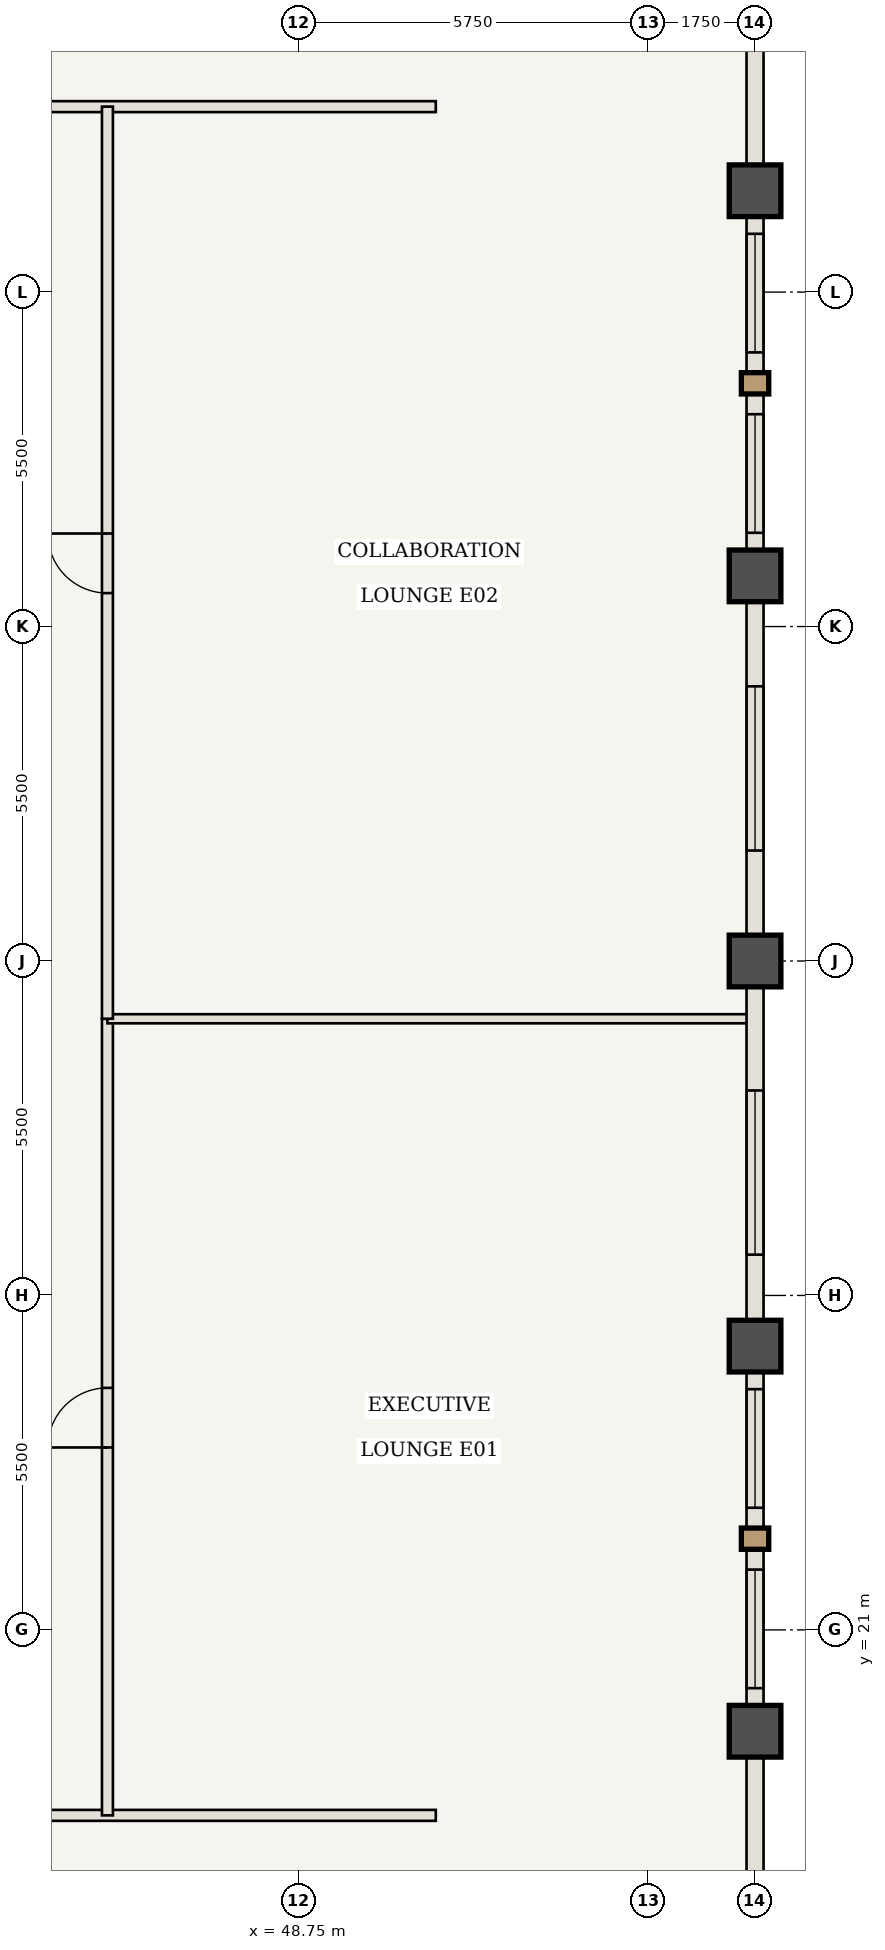
"""IFC4 building model, lengths in metres.
Left out: names, types, materials, properties, quantities, classifications, styles, units other than length and angle.
Written with IfcOpenShell. Run it as: python <this file> out.ifc"""

import sys

from ifc_helpers import new_model, si_unit, direction, frame, frame_2d, origin, origin_2d, place, context, subcontext, project, spatial, rectangle, extrude, element, fill, save


model = new_model("IFC4")
c1 = context("Model", 3, precision=1e-05, world=origin(), true_north=direction((0.0, 1.0)))
c2 = subcontext(c1, "Body", "Model", "MODEL_VIEW")
j1 = project(units=[si_unit("LENGTHUNIT", "METRE"), si_unit("PLANEANGLEUNIT", "RADIAN")], contexts=[c1])
p1 = place(None, origin())
s1 = spatial("IfcSite", under=j1, at=p1, CompositionType="ELEMENT")
p2 = place(p1, origin())
s2 = spatial("IfcBuilding", under=s1, at=p2, CompositionType="ELEMENT")
p3 = place(p2, frame((0.0, 0.0, 225.4)))
s3 = spatial("IfcBuildingStorey", under=s2, at=p3, CompositionType="ELEMENT", Elevation=225.4)
for number, where, z_axis, x_axis in (
    (1, (56.25, 19.333, 0.0), (0.0, 0.0, 1.0), (1.0, 0.0, 0.0)),
    (2, (56.25, 25.667, 0.0), (0.0, 0.0, 1.0), (1.0, 0.0, 0.0)),
    (3, (56.25, 32.0, 0.0), (0.0, 0.0, 1.0), (1.0, 0.0, 0.0)),
    (4, (56.25, 38.333, 0.0), (0.0, 0.0, 1.0), (1.0, 0.0, 0.0)),
    (5, (56.25, 44.667, 0.0), (0.0, 0.0, 1.0), (1.0, 0.0, 0.0)),
):
    element("IfcColumn", number, at=place(p3, frame(where, z_axis=z_axis, x_axis=x_axis)), inside=s3, PredefinedType="COLUMN", context=c2, shape_type="SweptSolid", body=[
        extrude(rectangle(XDim=0.85, YDim=0.85, at=origin_2d()), origin(), (0.0, 0.0, 1.0), 3.85),
    ])
p4 = place(p3, frame((39.258, 17.95, 0.0), z_axis=(0.0, 0.0, 1.0), x_axis=(1.0, 0.0, 0.0)))
e6 = element("IfcWall", 6, at=p4, inside=s3, PredefinedType="STANDARD", context=c2, shape_type="SweptSolid", body=[
    extrude(rectangle(XDim=11.742, YDim=0.18, at=frame_2d((5.871, 0.0))), origin(), (0.0, 0.0, 1.0), 3.685),
])
p5 = place(p4, frame((1.196, 0.0, 0.0)))
e7 = element("IfcOpeningElement", 7, at=p5, cuts=e6, PredefinedType="OPENING", context=c2, shape_type="SweptSolid", body=[
    extrude(rectangle(XDim=0.98, YDim=2.2, at=frame_2d((0.49, 1.1))), frame((0.0, 0.1, 0.0), z_axis=(0.0, -1.0, 0.0), x_axis=(1.0, 0.0, 0.0)), (0.0, 0.0, 1.0), 0.2),
])
p6 = place(p3, frame((13.0, 46.05, 0.0), z_axis=(0.0, 0.0, 1.0), x_axis=(1.0, 0.0, 0.0)))
e8 = element("IfcWall", 8, at=p6, inside=s3, PredefinedType="STANDARD", context=c2, shape_type="SweptSolid", body=[
    extrude(rectangle(XDim=38.0, YDim=0.18, at=frame_2d((19.0, 0.0))), origin(), (0.0, 0.0, 1.0), 3.685),
])
p7 = place(p6, frame((19.7, 0.0, 0.0)))
e9 = element("IfcOpeningElement", 9, at=p7, cuts=e8, PredefinedType="OPENING", context=c2, shape_type="SweptSolid", body=[
    extrude(rectangle(XDim=0.98, YDim=2.2, at=frame_2d((0.49, 1.1))), frame((0.0, 0.1, 0.0), z_axis=(0.0, -1.0, 0.0), x_axis=(1.0, 0.0, 0.0)), (0.0, 0.0, 1.0), 0.2),
])
p8 = place(p3, frame((45.6, 17.95, 0.0), z_axis=(0.0, 0.0, 1.0), x_axis=(0.0, 1.0, 0.0)))
e10 = element("IfcWall", 10, at=p8, inside=s3, PredefinedType="STANDARD", context=c2, shape_type="SweptSolid", body=[
    extrude(rectangle(XDim=13.1, YDim=0.18, at=frame_2d((6.55, 0.0))), origin(), (0.0, 0.0, 1.0), 3.685),
])
p9 = place(p8, frame((6.05, 0.0, 0.0)))
e11 = element("IfcOpeningElement", 11, at=p9, cuts=e10, PredefinedType="OPENING", context=c2, shape_type="SweptSolid", body=[
    extrude(rectangle(XDim=0.98, YDim=2.2, at=frame_2d((0.49, 1.1))), frame((0.0, 0.1, 0.0), z_axis=(0.0, -1.0, 0.0), x_axis=(1.0, 0.0, 0.0)), (0.0, 0.0, 1.0), 0.2),
])
p10 = place(p3, frame((45.6, 31.05, 0.0), z_axis=(0.0, 0.0, 1.0), x_axis=(1.0, 0.0, 0.0)))
e12 = element("IfcWall", 12, at=p10, inside=s3, PredefinedType="STANDARD", context=c2, shape_type="SweptSolid", body=[
    extrude(rectangle(XDim=10.59, YDim=0.15, at=frame_2d((5.295, 0.0))), origin(), (0.0, 0.0, 1.0), 3.685),
])
p11 = place(p3, frame((45.6, 31.05, 0.0), z_axis=(0.0, 0.0, 1.0), x_axis=(0.0, 1.0, 0.0)))
e13 = element("IfcWall", 13, at=p11, inside=s3, PredefinedType="STANDARD", context=c2, shape_type="SweptSolid", body=[
    extrude(rectangle(XDim=15.0, YDim=0.18, at=frame_2d((7.5, 0.0))), origin(), (0.0, 0.0, 1.0), 3.685),
])
p12 = place(p11, frame((7.0, 0.0, 0.0)))
e14 = element("IfcOpeningElement", 14, at=p12, cuts=e13, PredefinedType="OPENING", context=c2, shape_type="SweptSolid", body=[
    extrude(rectangle(XDim=0.98, YDim=2.2, at=frame_2d((0.49, 1.1))), frame((0.0, 0.1, 0.0), z_axis=(0.0, -1.0, 0.0), x_axis=(1.0, 0.0, 0.0)), (0.0, 0.0, 1.0), 0.2),
])
p13 = place(p3, frame((56.25, 19.333, 0.0), z_axis=(0.0, 0.0, 1.0), x_axis=(0.0, -1.0, 0.0)))
e15 = element("IfcWall", 15, at=p13, inside=s3, PredefinedType="USERDEFINED", context=c2, shape_type="SweptSolid", body=[
    extrude(rectangle(XDim=6.333, YDim=0.28, at=frame_2d((3.167, 0.0))), origin(), (0.0, 0.0, 1.0), 2.985),
])
p14 = place(p3, frame((56.25, 25.667, 0.0), z_axis=(0.0, 0.0, 1.0), x_axis=(0.0, -1.0, 0.0)))
e16 = element("IfcWall", 16, at=p14, inside=s3, PredefinedType="USERDEFINED", context=c2, shape_type="SweptSolid", body=[
    extrude(rectangle(XDim=6.333, YDim=0.28, at=frame_2d((3.167, 0.0))), origin(), (0.0, 0.0, 1.0), 2.985),
])
p15 = place(p14, frame((0.708, 0.0, 0.85)))
e17 = element("IfcOpeningElement", 17, at=p15, cuts=e16, PredefinedType="OPENING", context=c2, shape_type="SweptSolid", body=[
    extrude(rectangle(XDim=1.95, YDim=1.935, at=frame_2d((0.975, 0.968))), frame((0.0, 0.15, 0.0), z_axis=(0.0, -1.0, 0.0), x_axis=(1.0, 0.0, 0.0)), (0.0, 0.0, 1.0), 0.3),
])
p16 = place(p14, frame((3.675, 0.0, 0.85)))
e18 = element("IfcOpeningElement", 18, at=p16, cuts=e16, PredefinedType="OPENING", context=c2, shape_type="SweptSolid", body=[
    extrude(rectangle(XDim=1.95, YDim=1.935, at=frame_2d((0.975, 0.968))), frame((0.0, 0.15, 0.0), z_axis=(0.0, -1.0, 0.0), x_axis=(1.0, 0.0, 0.0)), (0.0, 0.0, 1.0), 0.3),
])
p17 = place(p3, frame((56.25, 32.0, 0.0), z_axis=(0.0, 0.0, 1.0), x_axis=(0.0, -1.0, 0.0)))
e19 = element("IfcWall", 19, at=p17, inside=s3, PredefinedType="USERDEFINED", context=c2, shape_type="SweptSolid", body=[
    extrude(rectangle(XDim=6.333, YDim=0.28, at=frame_2d((3.167, 0.0))), origin(), (0.0, 0.0, 1.0), 2.985),
])
p18 = place(p17, frame((2.129, 0.0, 0.85)))
e20 = element("IfcOpeningElement", 20, at=p18, cuts=e19, PredefinedType="OPENING", context=c2, shape_type="SweptSolid", body=[
    extrude(rectangle(XDim=2.7, YDim=1.935, at=frame_2d((1.35, 0.968))), frame((0.0, 0.15, 0.0), z_axis=(0.0, -1.0, 0.0), x_axis=(1.0, 0.0, 0.0)), (0.0, 0.0, 1.0), 0.3),
])
p19 = place(p3, frame((56.25, 38.333, 0.0), z_axis=(0.0, 0.0, 1.0), x_axis=(0.0, -1.0, 0.0)))
e21 = element("IfcWall", 21, at=p19, inside=s3, PredefinedType="USERDEFINED", context=c2, shape_type="SweptSolid", body=[
    extrude(rectangle(XDim=6.333, YDim=0.28, at=frame_2d((3.167, 0.0))), origin(), (0.0, 0.0, 1.0), 2.985),
])
p20 = place(p19, frame((1.817, 0.0, 0.85)))
e22 = element("IfcOpeningElement", 22, at=p20, cuts=e21, PredefinedType="OPENING", context=c2, shape_type="SweptSolid", body=[
    extrude(rectangle(XDim=2.7, YDim=1.935, at=frame_2d((1.35, 0.968))), frame((0.0, 0.15, 0.0), z_axis=(0.0, -1.0, 0.0), x_axis=(1.0, 0.0, 0.0)), (0.0, 0.0, 1.0), 0.3),
])
p21 = place(p3, frame((56.25, 44.667, 0.0), z_axis=(0.0, 0.0, 1.0), x_axis=(0.0, -1.0, 0.0)))
e23 = element("IfcWall", 23, at=p21, inside=s3, PredefinedType="USERDEFINED", context=c2, shape_type="SweptSolid", body=[
    extrude(rectangle(XDim=6.333, YDim=0.28, at=frame_2d((3.167, 0.0))), origin(), (0.0, 0.0, 1.0), 2.985),
])
p22 = place(p21, frame((0.708, 0.0, 0.85)))
e24 = element("IfcOpeningElement", 24, at=p22, cuts=e23, PredefinedType="OPENING", context=c2, shape_type="SweptSolid", body=[
    extrude(rectangle(XDim=1.95, YDim=1.935, at=frame_2d((0.975, 0.968))), frame((0.0, 0.15, 0.0), z_axis=(0.0, -1.0, 0.0), x_axis=(1.0, 0.0, 0.0)), (0.0, 0.0, 1.0), 0.3),
])
p23 = place(p21, frame((3.675, 0.0, 0.85)))
e25 = element("IfcOpeningElement", 25, at=p23, cuts=e23, PredefinedType="OPENING", context=c2, shape_type="SweptSolid", body=[
    extrude(rectangle(XDim=1.95, YDim=1.935, at=frame_2d((0.975, 0.968))), frame((0.0, 0.15, 0.0), z_axis=(0.0, -1.0, 0.0), x_axis=(1.0, 0.0, 0.0)), (0.0, 0.0, 1.0), 0.3),
])
p24 = place(p3, frame((56.25, 51.0, 0.0), z_axis=(0.0, 0.0, 1.0), x_axis=(0.0, -1.0, 0.0)))
e26 = element("IfcWall", 26, at=p24, inside=s3, PredefinedType="USERDEFINED", context=c2, shape_type="SweptSolid", body=[
    extrude(rectangle(XDim=6.333, YDim=0.28, at=frame_2d((3.167, 0.0))), origin(), (0.0, 0.0, 1.0), 2.985),
])
p25 = place(p9, origin())
e27 = element("IfcDoor", 27, at=p25, inside=s3, OperationType="SINGLE_SWING_LEFT", PredefinedType="DOOR", context=c2, shape_type="SweptSolid", body=[
    extrude(rectangle(XDim=0.98, YDim=2.2, at=frame_2d((0.49, 1.1))), frame((0.0, 0.025, 0.0), z_axis=(0.0, -1.0, 0.0), x_axis=(1.0, 0.0, 0.0)), (0.0, 0.0, 1.0), 0.05),
])
fill(e11, e27)
p26 = place(p12, origin())
e28 = element("IfcDoor", 28, at=p26, inside=s3, OperationType="SINGLE_SWING_RIGHT", PredefinedType="DOOR", context=c2, shape_type="SweptSolid", body=[
    extrude(rectangle(XDim=0.98, YDim=2.2, at=frame_2d((0.49, 1.1))), frame((0.0, 0.025, 0.0), z_axis=(0.0, -1.0, 0.0), x_axis=(1.0, 0.0, 0.0)), (0.0, 0.0, 1.0), 0.05),
])
fill(e14, e28)
p27 = place(p15, origin())
e29 = element("IfcWindow", 29, at=p27, inside=s3, PartitioningType="SINGLE_PANEL", PredefinedType="WINDOW", context=c2, shape_type="SweptSolid", body=[
    extrude(rectangle(XDim=1.95, YDim=1.935, at=frame_2d((0.975, 0.968))), frame((0.0, 0.03, 0.0), z_axis=(0.0, -1.0, 0.0), x_axis=(1.0, 0.0, 0.0)), (0.0, 0.0, 1.0), 0.06),
])
fill(e17, e29)
p28 = place(p16, origin())
e30 = element("IfcWindow", 30, at=p28, inside=s3, PartitioningType="SINGLE_PANEL", PredefinedType="WINDOW", context=c2, shape_type="SweptSolid", body=[
    extrude(rectangle(XDim=1.95, YDim=1.935, at=frame_2d((0.975, 0.968))), frame((0.0, 0.03, 0.0), z_axis=(0.0, -1.0, 0.0), x_axis=(1.0, 0.0, 0.0)), (0.0, 0.0, 1.0), 0.06),
])
fill(e18, e30)
p29 = place(p18, origin())
e31 = element("IfcWindow", 31, at=p29, inside=s3, PartitioningType="SINGLE_PANEL", PredefinedType="WINDOW", context=c2, shape_type="SweptSolid", body=[
    extrude(rectangle(XDim=2.7, YDim=1.935, at=frame_2d((1.35, 0.968))), frame((0.0, 0.03, 0.0), z_axis=(0.0, -1.0, 0.0), x_axis=(1.0, 0.0, 0.0)), (0.0, 0.0, 1.0), 0.06),
])
fill(e20, e31)
p30 = place(p20, origin())
e32 = element("IfcWindow", 32, at=p30, inside=s3, PartitioningType="SINGLE_PANEL", PredefinedType="WINDOW", context=c2, shape_type="SweptSolid", body=[
    extrude(rectangle(XDim=2.7, YDim=1.935, at=frame_2d((1.35, 0.968))), frame((0.0, 0.03, 0.0), z_axis=(0.0, -1.0, 0.0), x_axis=(1.0, 0.0, 0.0)), (0.0, 0.0, 1.0), 0.06),
])
fill(e22, e32)
p31 = place(p22, origin())
e33 = element("IfcWindow", 33, at=p31, inside=s3, PartitioningType="SINGLE_PANEL", PredefinedType="WINDOW", context=c2, shape_type="SweptSolid", body=[
    extrude(rectangle(XDim=1.95, YDim=1.935, at=frame_2d((0.975, 0.968))), frame((0.0, 0.03, 0.0), z_axis=(0.0, -1.0, 0.0), x_axis=(1.0, 0.0, 0.0)), (0.0, 0.0, 1.0), 0.06),
])
fill(e24, e33)
p32 = place(p23, origin())
e34 = element("IfcWindow", 34, at=p32, inside=s3, PartitioningType="SINGLE_PANEL", PredefinedType="WINDOW", context=c2, shape_type="SweptSolid", body=[
    extrude(rectangle(XDim=1.95, YDim=1.935, at=frame_2d((0.975, 0.968))), frame((0.0, 0.03, 0.0), z_axis=(0.0, -1.0, 0.0), x_axis=(1.0, 0.0, 0.0)), (0.0, 0.0, 1.0), 0.06),
])
fill(e25, e34)
save(model, sys.argv[1])
